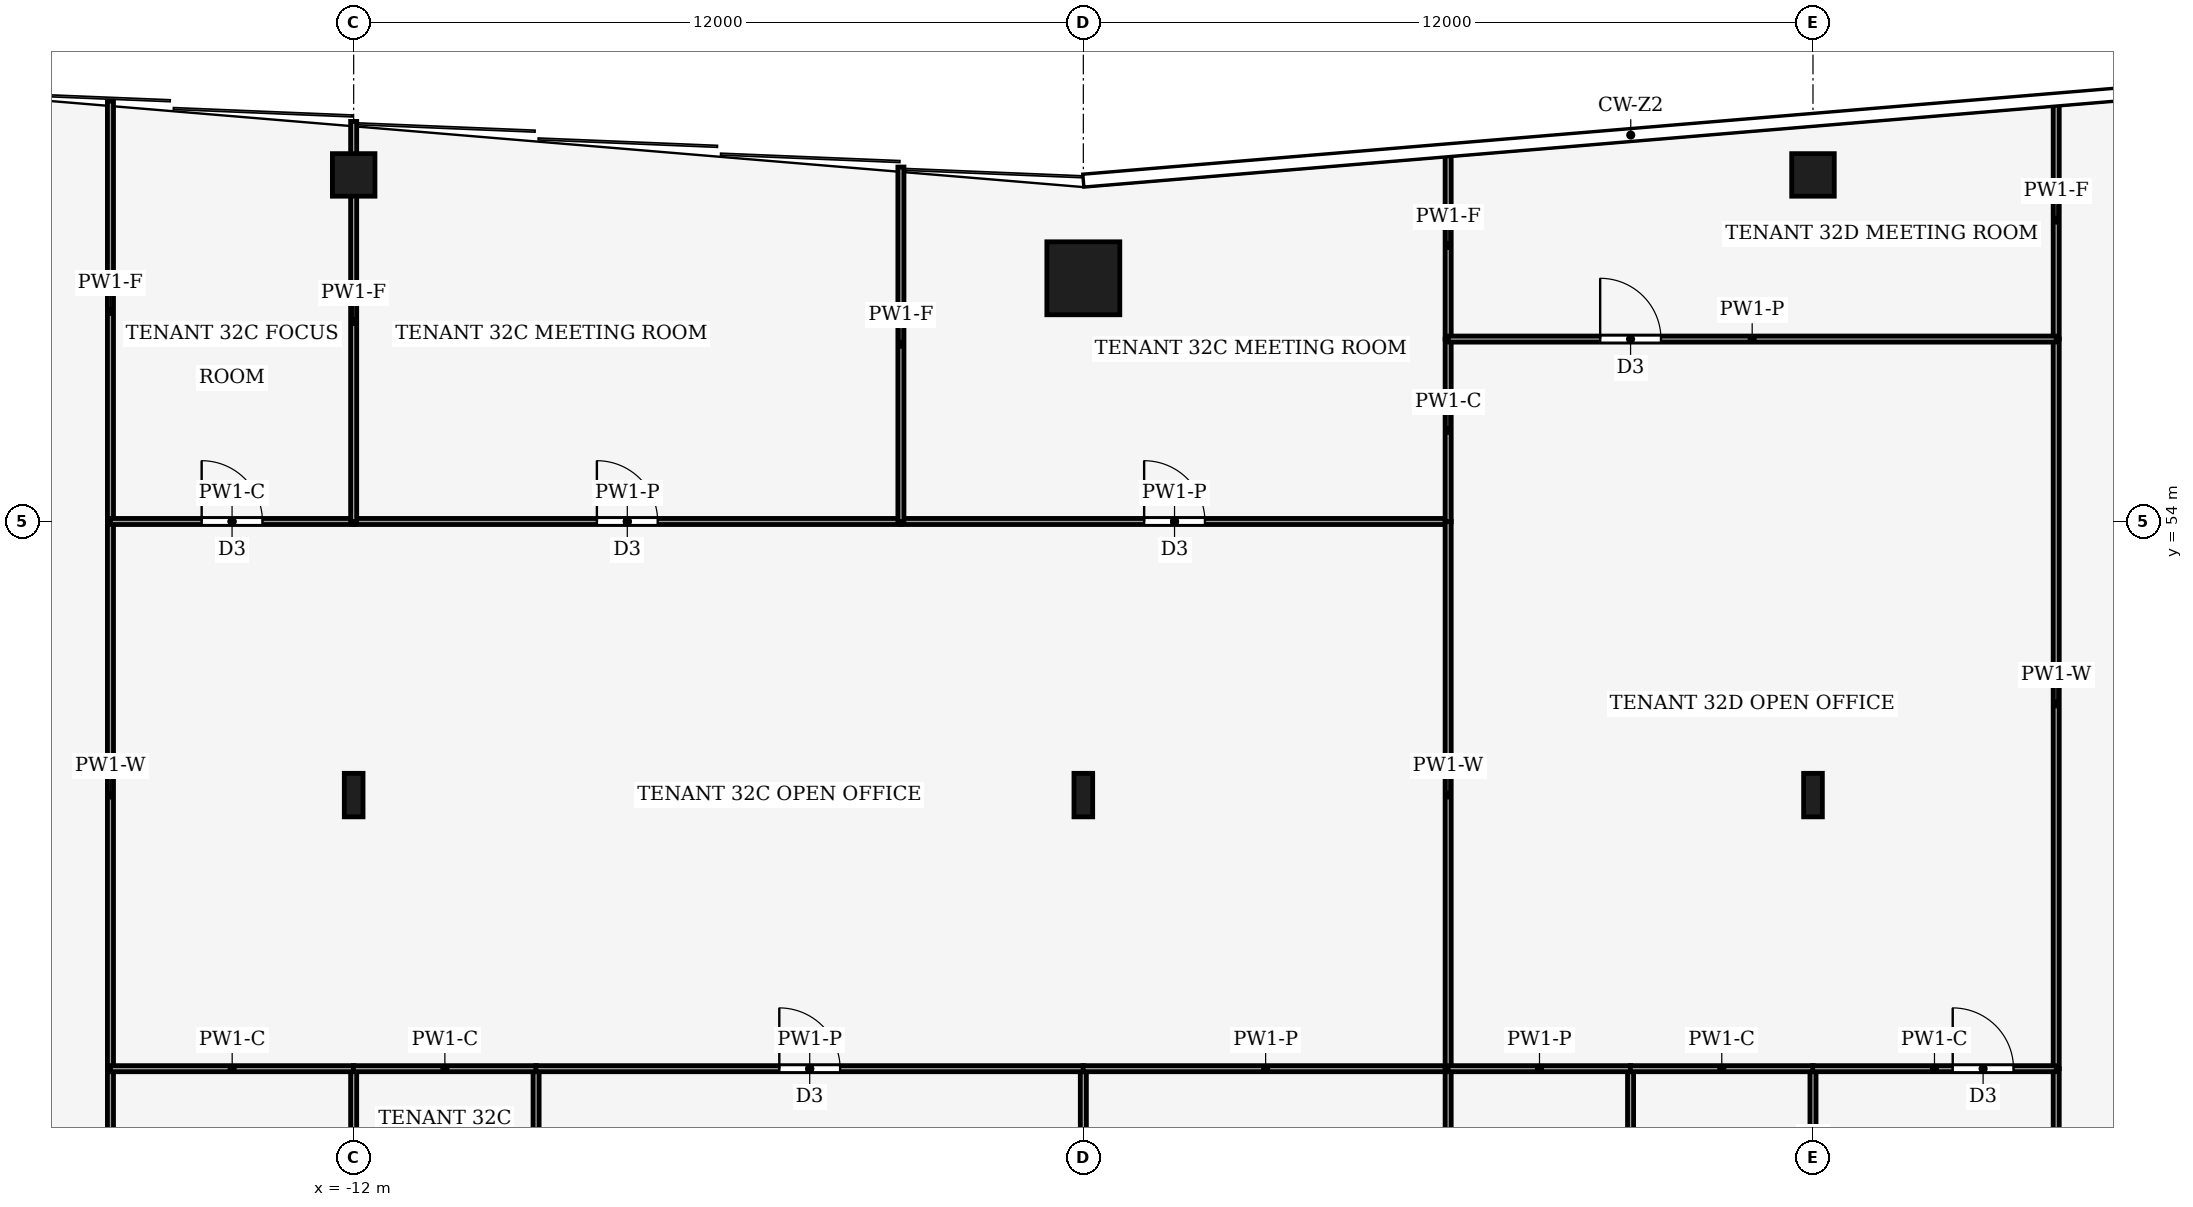
"""IFC4 building model, lengths in metres.
Left out: names, types, materials, properties, quantities, classifications, styles, units other than length and angle.
Written with IfcOpenShell. Run it as: python <this file> out.ifc"""

import sys

from ifc_helpers import new_model, si_unit, direction, frame, frame_2d, origin, origin_2d, place, context, subcontext, project, spatial, rectangle, hollow_rectangle, i_section, extrude, element, fill, save


model = new_model("IFC4")
c1 = context("Model", 3, precision=1e-05, world=origin(), true_north=direction((0.0, 1.0)))
c2 = subcontext(c1, "Body", "Model", "MODEL_VIEW")
j1 = project(units=[si_unit("LENGTHUNIT", "METRE"), si_unit("PLANEANGLEUNIT", "RADIAN")], contexts=[c1])
p1 = place(None, origin())
s1 = spatial("IfcSite", under=j1, at=p1, CompositionType="ELEMENT")
p2 = place(p1, origin())
s2 = spatial("IfcBuilding", under=s1, at=p2, CompositionType="ELEMENT")
p3 = place(p2, frame((0.0, 0.0, 142.0)))
s3 = spatial("IfcBuildingStorey", under=s2, at=p3, CompositionType="ELEMENT", Elevation=142.0)
p4 = place(p3, frame((0.0, 58.0, 0.0), z_axis=(0.0, 0.0, 1.0), x_axis=(1.0, 0.0, 0.0)))
e1 = element("IfcColumn", 1, at=p4, inside=s3, PredefinedType="COLUMN", context=c2, shape_type="SweptSolid", body=[
    extrude(hollow_rectangle(XDim=1.2, YDim=1.2, WallThickness=0.07, at=origin_2d()), origin(), (0.0, 0.0, 1.0), 4.0),
])
for number, where, z_axis, x_axis in (
    (2, (-12.0, 59.7, 0.0), (0.0, 0.0, 1.0), (1.0, 0.0, 0.0)),
    (3, (12.0, 59.7, 0.0), (0.0, 0.0, 1.0), (1.0, 0.0, 0.0)),
):
    element("IfcColumn", number, at=place(p3, frame(where, z_axis=z_axis, x_axis=x_axis)), inside=s3, PredefinedType="COLUMN", context=c2, shape_type="SweptSolid", body=[
        extrude(hollow_rectangle(XDim=0.7, YDim=0.7, WallThickness=0.03, at=origin_2d()), origin(), (0.0, 0.0, 1.0), 4.0),
    ])
for number, where, z_axis, x_axis in (
    (4, (-12.0, 49.5, 0.0), (0.0, 0.0, 1.0), (1.0, 0.0, 0.0)),
    (5, (0.0, 49.5, 0.0), (0.0, 0.0, 1.0), (1.0, 0.0, 0.0)),
    (6, (12.0, 49.5, 0.0), (0.0, 0.0, 1.0), (1.0, 0.0, 0.0)),
):
    element("IfcColumn", number, at=place(p3, frame(where, z_axis=z_axis, x_axis=x_axis)), inside=s3, PredefinedType="COLUMN", context=c2, shape_type="SweptSolid", body=[
        extrude(i_section(OverallWidth=0.308, OverallDepth=0.716, WebThickness=0.021, FlangeThickness=0.04, FilletRadius=0.027, at=origin_2d()), origin(), (0.0, 0.0, 1.0), 4.0),
    ])
p5 = place(p3, frame((-16.0, 41.0, 0.0), z_axis=(0.0, 0.0, 1.0), x_axis=(0.0, 1.0, 0.0)))
e7 = element("IfcWall", 7, at=p5, inside=s3, PredefinedType="PARTITIONING", context=c2, shape_type="SweptSolid", body=[
    extrude(rectangle(XDim=4.0, YDim=0.1, at=frame_2d((2.0, 0.0))), origin(), (0.0, 0.0, 1.0), 3.44),
])
p6 = place(p3, frame((-16.0, 45.0, 0.0), z_axis=(0.0, 0.0, 1.0), x_axis=(0.0, 1.0, 0.0)))
e8 = element("IfcWall", 8, at=p6, inside=s3, PredefinedType="PARTITIONING", context=c2, shape_type="SweptSolid", body=[
    extrude(rectangle(XDim=9.0, YDim=0.1, at=frame_2d((4.5, 0.0))), origin(), (0.0, 0.0, 1.0), 3.24),
])
p7 = place(p3, frame((-16.0, 54.0, 0.0), z_axis=(0.0, 0.0, 1.0), x_axis=(0.0, 1.0, 0.0)))
e9 = element("IfcWall", 9, at=p7, inside=s3, PredefinedType="PARTITIONING", context=c2, shape_type="SweptSolid", body=[
    extrude(rectangle(XDim=6.913, YDim=0.1, at=frame_2d((3.457, 0.0))), origin(), (0.0, 0.0, 1.0), 3.04),
])
p8 = place(p3, frame((16.0, 45.0, 0.0), z_axis=(0.0, 0.0, 1.0), x_axis=(0.0, -1.0, 0.0)))
e10 = element("IfcWall", 10, at=p8, inside=s3, PredefinedType="PARTITIONING", context=c2, shape_type="SweptSolid", body=[
    extrude(rectangle(XDim=4.0, YDim=0.1, at=frame_2d((2.0, 0.0))), origin(), (0.0, 0.0, 1.0), 3.44),
])
p9 = place(p3, frame((16.0, 57.0, 0.0), z_axis=(0.0, 0.0, 1.0), x_axis=(0.0, -1.0, 0.0)))
e11 = element("IfcWall", 11, at=p9, inside=s3, PredefinedType="PARTITIONING", context=c2, shape_type="SweptSolid", body=[
    extrude(rectangle(XDim=12.0, YDim=0.1, at=frame_2d((6.0, 0.0))), origin(), (0.0, 0.0, 1.0), 3.24),
])
p10 = place(p3, frame((16.0, 60.913, 0.0), z_axis=(0.0, 0.0, 1.0), x_axis=(0.0, -1.0, 0.0)))
e12 = element("IfcWall", 12, at=p10, inside=s3, PredefinedType="PARTITIONING", context=c2, shape_type="SweptSolid", body=[
    extrude(rectangle(XDim=3.913, YDim=0.1, at=frame_2d((1.957, 0.0))), origin(), (0.0, 0.0, 1.0), 3.04),
])
p11 = place(p3, frame((-12.0, 41.0, 0.0), z_axis=(0.0, 0.0, 1.0), x_axis=(0.0, 1.0, 0.0)))
e13 = element("IfcWall", 13, at=p11, inside=s3, PredefinedType="PARTITIONING", context=c2, shape_type="SweptSolid", body=[
    extrude(rectangle(XDim=4.0, YDim=0.1, at=frame_2d((2.0, 0.0))), origin(), (0.0, 0.0, 1.0), 3.44),
])
p12 = place(p3, frame((-11.996, 45.0, 0.0), z_axis=(0.0, 0.0, 1.0), x_axis=(-1.0, 0.0, 0.0)))
e14 = element("IfcWall", 14, at=p12, inside=s3, PredefinedType="PARTITIONING", context=c2, shape_type="SweptSolid", body=[
    extrude(rectangle(XDim=4.004, YDim=0.1, at=frame_2d((2.002, 0.0))), origin(), (0.0, 0.0, 1.0), 3.87),
])
p13 = place(p3, frame((-9.0, 41.0, 0.0), z_axis=(0.0, 0.0, 1.0), x_axis=(0.0, 1.0, 0.0)))
e15 = element("IfcWall", 15, at=p13, inside=s3, PredefinedType="PARTITIONING", context=c2, shape_type="SweptSolid", body=[
    extrude(rectangle(XDim=4.0, YDim=0.1, at=frame_2d((2.0, 0.0))), origin(), (0.0, 0.0, 1.0), 3.87),
])
p14 = place(p13, frame((1.5, 0.0, 0.0)))
e16 = element("IfcOpeningElement", 16, at=p14, cuts=e15, PredefinedType="OPENING", context=c2, shape_type="SweptSolid", body=[
    extrude(rectangle(XDim=1.0, YDim=2.1, at=frame_2d((0.5, 1.05))), frame((0.0, 0.06, 0.0), z_axis=(0.0, -1.0, 0.0), x_axis=(1.0, 0.0, 0.0)), (0.0, 0.0, 1.0), 0.12),
])
p15 = place(p3, frame((-8.996, 45.0, 0.0), z_axis=(0.0, 0.0, 1.0), x_axis=(-1.0, 0.0, 0.0)))
e17 = element("IfcWall", 17, at=p15, inside=s3, PredefinedType="PARTITIONING", context=c2, shape_type="SweptSolid", body=[
    extrude(rectangle(XDim=3.008, YDim=0.1, at=frame_2d((1.504, 0.0))), origin(), (0.0, 0.0, 1.0), 3.87),
])
p16 = place(p3, frame((0.0, 41.0, 0.0), z_axis=(0.0, 0.0, 1.0), x_axis=(0.0, 1.0, 0.0)))
e18 = element("IfcWall", 18, at=p16, inside=s3, PredefinedType="PARTITIONING", context=c2, shape_type="SweptSolid", body=[
    extrude(rectangle(XDim=4.0, YDim=0.1, at=frame_2d((2.0, 0.0))), origin(), (0.0, 0.0, 1.0), 3.44),
])
p17 = place(p3, frame((-9.004, 45.0, 0.0), z_axis=(0.0, 0.0, 1.0), x_axis=(1.0, 0.0, 0.0)))
e19 = element("IfcWall", 19, at=p17, inside=s3, PredefinedType="PARTITIONING", context=c2, shape_type="SweptSolid", body=[
    extrude(rectangle(XDim=9.008, YDim=0.1, at=frame_2d((4.504, 0.0))), origin(), (0.0, 0.0, 1.0), 3.44),
])
p18 = place(p17, frame((4.004, 0.0, 0.0)))
e20 = element("IfcOpeningElement", 20, at=p18, cuts=e19, PredefinedType="OPENING", context=c2, shape_type="SweptSolid", body=[
    extrude(rectangle(XDim=1.0, YDim=2.1, at=frame_2d((0.5, 1.05))), frame((0.0, 0.06, 0.0), z_axis=(0.0, -1.0, 0.0), x_axis=(1.0, 0.0, 0.0)), (0.0, 0.0, 1.0), 0.12),
])
p19 = place(p3, frame((6.0, 45.0, 0.0), z_axis=(0.0, 0.0, 1.0), x_axis=(-1.0, 0.0, 0.0)))
e21 = element("IfcWall", 21, at=p19, inside=s3, PredefinedType="PARTITIONING", context=c2, shape_type="SweptSolid", body=[
    extrude(rectangle(XDim=6.004, YDim=0.1, at=frame_2d((3.002, 0.0))), origin(), (0.0, 0.0, 1.0), 3.44),
])
p20 = place(p3, frame((6.0, 41.0, 0.0), z_axis=(0.0, 0.0, 1.0), x_axis=(0.0, 1.0, 0.0)))
e22 = element("IfcWall", 22, at=p20, inside=s3, PredefinedType="PARTITIONING", context=c2, shape_type="SweptSolid", body=[
    extrude(rectangle(XDim=4.0, YDim=0.1, at=frame_2d((2.0, 0.0))), origin(), (0.0, 0.0, 1.0), 3.87),
])
p21 = place(p3, frame((-16.0, 54.0, 0.0), z_axis=(0.0, 0.0, 1.0), x_axis=(1.0, 0.0, 0.0)))
e23 = element("IfcWall", 23, at=p21, inside=s3, PredefinedType="PARTITIONING", context=c2, shape_type="SweptSolid", body=[
    extrude(rectangle(XDim=4.0, YDim=0.1, at=frame_2d((2.0, 0.0))), origin(), (0.0, 0.0, 1.0), 3.87),
])
p22 = place(p21, frame((1.5, 0.0, 0.0)))
e24 = element("IfcOpeningElement", 24, at=p22, cuts=e23, PredefinedType="OPENING", context=c2, shape_type="SweptSolid", body=[
    extrude(rectangle(XDim=1.0, YDim=2.1, at=frame_2d((0.5, 1.05))), frame((0.0, 0.06, 0.0), z_axis=(0.0, -1.0, 0.0), x_axis=(1.0, 0.0, 0.0)), (0.0, 0.0, 1.0), 0.12),
])
p23 = place(p3, frame((-12.0, 54.0, 0.0), z_axis=(0.0, 0.0, 1.0), x_axis=(1.0, 0.0, 0.0)))
e25 = element("IfcWall", 25, at=p23, inside=s3, PredefinedType="PARTITIONING", context=c2, shape_type="SweptSolid", body=[
    extrude(rectangle(XDim=9.0, YDim=0.1, at=frame_2d((4.5, 0.0))), origin(), (0.0, 0.0, 1.0), 3.44),
])
p24 = place(p23, frame((4.0, 0.0, 0.0)))
e26 = element("IfcOpeningElement", 26, at=p24, cuts=e25, PredefinedType="OPENING", context=c2, shape_type="SweptSolid", body=[
    extrude(rectangle(XDim=1.0, YDim=2.1, at=frame_2d((0.5, 1.05))), frame((0.0, 0.06, 0.0), z_axis=(0.0, -1.0, 0.0), x_axis=(1.0, 0.0, 0.0)), (0.0, 0.0, 1.0), 0.12),
])
p25 = place(p3, frame((-3.0, 54.0, 0.0), z_axis=(0.0, 0.0, 1.0), x_axis=(1.0, 0.0, 0.0)))
e27 = element("IfcWall", 27, at=p25, inside=s3, PredefinedType="PARTITIONING", context=c2, shape_type="SweptSolid", body=[
    extrude(rectangle(XDim=9.0, YDim=0.1, at=frame_2d((4.5, 0.0))), origin(), (0.0, 0.0, 1.0), 3.44),
])
p26 = place(p25, frame((4.0, 0.0, 0.0)))
e28 = element("IfcOpeningElement", 28, at=p26, cuts=e27, PredefinedType="OPENING", context=c2, shape_type="SweptSolid", body=[
    extrude(rectangle(XDim=1.0, YDim=2.1, at=frame_2d((0.5, 1.05))), frame((0.0, 0.06, 0.0), z_axis=(0.0, -1.0, 0.0), x_axis=(1.0, 0.0, 0.0)), (0.0, 0.0, 1.0), 0.12),
])
p27 = place(p3, frame((6.0, 45.0, 0.0), z_axis=(0.0, 0.0, 1.0), x_axis=(0.0, 1.0, 0.0)))
e29 = element("IfcWall", 29, at=p27, inside=s3, PredefinedType="PARTITIONING", context=c2, shape_type="SweptSolid", body=[
    extrude(rectangle(XDim=9.004, YDim=0.1, at=frame_2d((4.502, 0.0))), origin(), (0.0, 0.0, 1.0), 3.24),
])
p28 = place(p3, frame((-12.0, 54.0, 0.0), z_axis=(0.0, 0.0, 1.0), x_axis=(0.0, 1.0, 0.0)))
e30 = element("IfcWall", 30, at=p28, inside=s3, PredefinedType="PARTITIONING", context=c2, shape_type="SweptSolid", body=[
    extrude(rectangle(XDim=6.58, YDim=0.1, at=frame_2d((3.29, 0.0))), origin(), (0.0, 0.0, 1.0), 3.04),
])
p29 = place(p3, frame((-3.0, 54.0, 0.0), z_axis=(0.0, 0.0, 1.0), x_axis=(0.0, 1.0, 0.0)))
e31 = element("IfcWall", 31, at=p29, inside=s3, PredefinedType="PARTITIONING", context=c2, shape_type="SweptSolid", body=[
    extrude(rectangle(XDim=5.83, YDim=0.1, at=frame_2d((2.915, 0.0))), origin(), (0.0, 0.0, 1.0), 3.04),
])
p30 = place(p3, frame((6.0, 53.996, 0.0), z_axis=(0.0, 0.0, 1.0), x_axis=(0.0, 1.0, 0.0)))
e32 = element("IfcWall", 32, at=p30, inside=s3, PredefinedType="PARTITIONING", context=c2, shape_type="SweptSolid", body=[
    extrude(rectangle(XDim=3.004, YDim=0.1, at=frame_2d((1.502, 0.0))), origin(), (0.0, 0.0, 1.0), 3.87),
])
p31 = place(p3, frame((6.0, 57.0, 0.0), z_axis=(0.0, 0.0, 1.0), x_axis=(0.0, 1.0, 0.0)))
e33 = element("IfcWall", 33, at=p31, inside=s3, PredefinedType="PARTITIONING", context=c2, shape_type="SweptSolid", body=[
    extrude(rectangle(XDim=3.08, YDim=0.1, at=frame_2d((1.54, 0.0))), origin(), (0.0, 0.0, 1.0), 3.04),
])
p32 = place(p3, frame((9.0, 41.0, 0.0), z_axis=(0.0, 0.0, 1.0), x_axis=(0.0, 1.0, 0.0)))
e34 = element("IfcWall", 34, at=p32, inside=s3, PredefinedType="PARTITIONING", context=c2, shape_type="SweptSolid", body=[
    extrude(rectangle(XDim=4.0, YDim=0.1, at=frame_2d((2.0, 0.0))), origin(), (0.0, 0.0, 1.0), 3.87),
])
p33 = place(p3, frame((9.004, 45.0, 0.0), z_axis=(0.0, 0.0, 1.0), x_axis=(-1.0, 0.0, 0.0)))
e35 = element("IfcWall", 35, at=p33, inside=s3, PredefinedType="PARTITIONING", context=c2, shape_type="SweptSolid", body=[
    extrude(rectangle(XDim=3.004, YDim=0.1, at=frame_2d((1.502, 0.0))), origin(), (0.0, 0.0, 1.0), 3.44),
])
p34 = place(p3, frame((12.0, 41.0, 0.0), z_axis=(0.0, 0.0, 1.0), x_axis=(0.0, 1.0, 0.0)))
e36 = element("IfcWall", 36, at=p34, inside=s3, PredefinedType="PARTITIONING", context=c2, shape_type="SweptSolid", body=[
    extrude(rectangle(XDim=4.0, YDim=0.1, at=frame_2d((2.0, 0.0))), origin(), (0.0, 0.0, 1.0), 3.44),
])
p35 = place(p34, frame((1.9, 0.0, 0.0)))
e37 = element("IfcOpeningElement", 37, at=p35, cuts=e36, PredefinedType="OPENING", context=c2, shape_type="SweptSolid", body=[
    extrude(rectangle(XDim=1.0, YDim=2.1, at=frame_2d((0.5, 1.05))), frame((0.0, 0.06, 0.0), z_axis=(0.0, -1.0, 0.0), x_axis=(1.0, 0.0, 0.0)), (0.0, 0.0, 1.0), 0.12),
])
p36 = place(p3, frame((12.004, 45.0, 0.0), z_axis=(0.0, 0.0, 1.0), x_axis=(-1.0, 0.0, 0.0)))
e38 = element("IfcWall", 38, at=p36, inside=s3, PredefinedType="PARTITIONING", context=c2, shape_type="SweptSolid", body=[
    extrude(rectangle(XDim=3.008, YDim=0.1, at=frame_2d((1.504, 0.0))), origin(), (0.0, 0.0, 1.0), 3.87),
])
p37 = place(p3, frame((11.996, 45.0, 0.0), z_axis=(0.0, 0.0, 1.0), x_axis=(1.0, 0.0, 0.0)))
e39 = element("IfcWall", 39, at=p37, inside=s3, PredefinedType="PARTITIONING", context=c2, shape_type="SweptSolid", body=[
    extrude(rectangle(XDim=4.004, YDim=0.1, at=frame_2d((2.002, 0.0))), origin(), (0.0, 0.0, 1.0), 3.87),
])
p38 = place(p37, frame((2.302, 0.0, 0.0)))
e40 = element("IfcOpeningElement", 40, at=p38, cuts=e39, PredefinedType="OPENING", context=c2, shape_type="SweptSolid", body=[
    extrude(rectangle(XDim=1.0, YDim=2.1, at=frame_2d((0.5, 1.05))), frame((0.0, 0.06, 0.0), z_axis=(0.0, -1.0, 0.0), x_axis=(1.0, 0.0, 0.0)), (0.0, 0.0, 1.0), 0.12),
])
p39 = place(p3, frame((6.0, 57.0, 0.0), z_axis=(0.0, 0.0, 1.0), x_axis=(1.0, 0.0, 0.0)))
e41 = element("IfcWall", 41, at=p39, inside=s3, PredefinedType="PARTITIONING", context=c2, shape_type="SweptSolid", body=[
    extrude(rectangle(XDim=10.0, YDim=0.1, at=frame_2d((5.0, 0.0))), origin(), (0.0, 0.0, 1.0), 3.44),
])
p40 = place(p39, frame((2.5, 0.0, 0.0)))
e42 = element("IfcOpeningElement", 42, at=p40, cuts=e41, PredefinedType="OPENING", context=c2, shape_type="SweptSolid", body=[
    extrude(rectangle(XDim=1.0, YDim=2.1, at=frame_2d((0.5, 1.05))), frame((0.0, 0.06, 0.0), z_axis=(0.0, -1.0, 0.0), x_axis=(1.0, 0.0, 0.0)), (0.0, 0.0, 1.0), 0.12),
])
p41 = place(p18, origin())
e43 = element("IfcDoor", 43, at=p41, inside=s3, OperationType="SINGLE_SWING_LEFT", PredefinedType="DOOR", context=c2, shape_type="SweptSolid", body=[
    extrude(rectangle(XDim=1.0, YDim=2.1, at=frame_2d((0.5, 1.05))), frame((0.0, 0.025, 0.0), z_axis=(0.0, -1.0, 0.0), x_axis=(1.0, 0.0, 0.0)), (0.0, 0.0, 1.0), 0.05),
])
fill(e20, e43)
p42 = place(p22, origin())
e44 = element("IfcDoor", 44, at=p42, inside=s3, OperationType="SINGLE_SWING_RIGHT", PredefinedType="DOOR", context=c2, shape_type="SweptSolid", body=[
    extrude(rectangle(XDim=1.0, YDim=2.1, at=frame_2d((0.5, 1.05))), frame((0.0, 0.025, 0.0), z_axis=(0.0, -1.0, 0.0), x_axis=(1.0, 0.0, 0.0)), (0.0, 0.0, 1.0), 0.05),
])
fill(e24, e44)
p43 = place(p24, origin())
e45 = element("IfcDoor", 45, at=p43, inside=s3, OperationType="SINGLE_SWING_LEFT", PredefinedType="DOOR", context=c2, shape_type="SweptSolid", body=[
    extrude(rectangle(XDim=1.0, YDim=2.1, at=frame_2d((0.5, 1.05))), frame((0.0, 0.025, 0.0), z_axis=(0.0, -1.0, 0.0), x_axis=(1.0, 0.0, 0.0)), (0.0, 0.0, 1.0), 0.05),
])
fill(e26, e45)
p44 = place(p26, origin())
e46 = element("IfcDoor", 46, at=p44, inside=s3, OperationType="SINGLE_SWING_RIGHT", PredefinedType="DOOR", context=c2, shape_type="SweptSolid", body=[
    extrude(rectangle(XDim=1.0, YDim=2.1, at=frame_2d((0.5, 1.05))), frame((0.0, 0.025, 0.0), z_axis=(0.0, -1.0, 0.0), x_axis=(1.0, 0.0, 0.0)), (0.0, 0.0, 1.0), 0.05),
])
fill(e28, e46)
p45 = place(p38, origin())
e47 = element("IfcDoor", 47, at=p45, inside=s3, OperationType="SINGLE_SWING_RIGHT", PredefinedType="DOOR", context=c2, shape_type="SweptSolid", body=[
    extrude(rectangle(XDim=1.0, YDim=2.1, at=frame_2d((0.5, 1.05))), frame((0.0, 0.025, 0.0), z_axis=(0.0, -1.0, 0.0), x_axis=(1.0, 0.0, 0.0)), (0.0, 0.0, 1.0), 0.05),
])
fill(e40, e47)
p46 = place(p40, origin())
e48 = element("IfcDoor", 48, at=p46, inside=s3, OperationType="SINGLE_SWING_LEFT", PredefinedType="DOOR", context=c2, shape_type="SweptSolid", body=[
    extrude(rectangle(XDim=1.0, YDim=2.1, at=frame_2d((0.5, 1.05))), frame((0.0, 0.025, 0.0), z_axis=(0.0, -1.0, 0.0), x_axis=(1.0, 0.0, 0.0)), (0.0, 0.0, 1.0), 0.05),
])
fill(e42, e48)
save(model, sys.argv[1])
